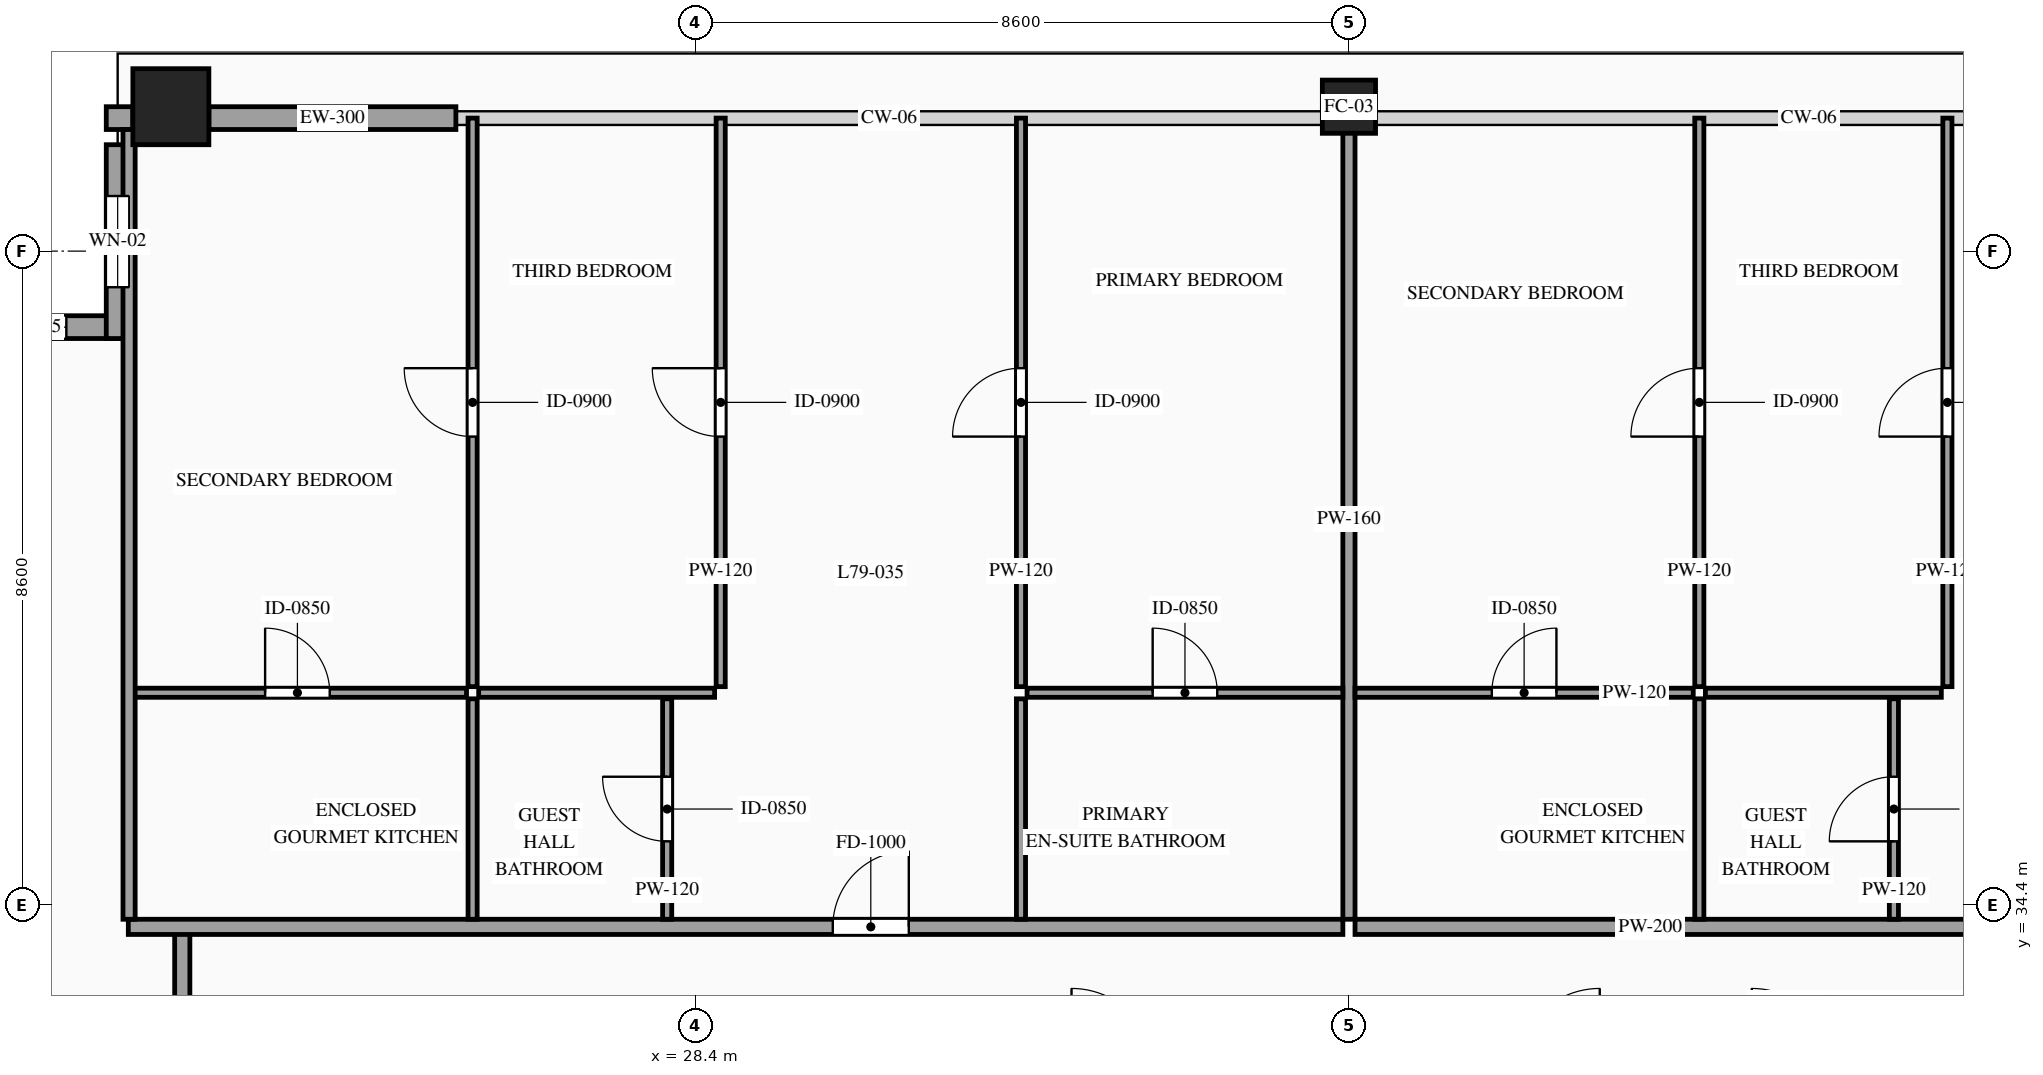
"""IFC4 building model, lengths in metres.
Left out: names, types, materials, properties, quantities, classifications, styles, units other than length and angle.
Written with IfcOpenShell. Run it as: python <this file> out.ifc"""

import sys

from ifc_helpers import new_model, si_unit, direction, frame, frame_2d, origin, origin_2d, place, context, subcontext, project, spatial, rectangle, hollow_rectangle, extrude, source, transform, mapped, element, fill, save


model = new_model("IFC4")
c1 = context("Model", 3, precision=1e-05, world=origin(), true_north=direction((0.0, 1.0)))
c2 = subcontext(c1, "Body", "Model", "MODEL_VIEW")
j1 = project(units=[si_unit("LENGTHUNIT", "METRE"), si_unit("PLANEANGLEUNIT", "RADIAN")], contexts=[c1])
p1 = place(None, origin())
s1 = spatial("IfcSite", under=j1, at=p1, CompositionType="ELEMENT")
p2 = place(p1, origin())
s2 = spatial("IfcBuilding", under=s1, at=p2, CompositionType="ELEMENT")
p3 = place(p2, frame((0.0, 0.0, 296.1)))
s3 = spatial("IfcBuildingStorey", under=s2, at=p3, CompositionType="ELEMENT", Elevation=296.1)
m1 = source(origin(), c2, "Body", "SweptSolid", [
    extrude(hollow_rectangle(XDim=1.0, YDim=1.0, WallThickness=0.048, at=origin_2d()), origin(), (0.0, 0.0, 1.0), 3.5),
])
p4 = place(p3, frame((21.5, 44.9, 0.0), z_axis=(0.0, 0.0, 1.0), x_axis=(1.0, 0.0, 0.0)))
e1 = element("IfcColumn", 1, at=p4, inside=s3, PredefinedType="COLUMN", context=c2, shape_type="MappedRepresentation", body=[
    mapped(m1, transform((0.0, 0.0, 0.0), scale=1.0)),
])
m2 = source(origin(), c2, "Body", "SweptSolid", [
    extrude(hollow_rectangle(XDim=0.7, YDim=0.7, WallThickness=0.032, at=origin_2d()), origin(), (0.0, 0.0, 1.0), 3.5),
])
p5 = place(p3, frame((37.0, 44.9, 0.0), z_axis=(0.0, 0.0, 1.0), x_axis=(1.0, 0.0, 0.0)))
e2 = element("IfcColumn", 2, at=p5, inside=s3, PredefinedType="COLUMN", context=c2, shape_type="MappedRepresentation", body=[
    mapped(m2, transform((0.0, 0.0, 0.0), scale=1.0)),
])
p6 = place(p3, frame((20.95, 42.0, 0.0), z_axis=(0.0, 0.0, 1.0), x_axis=(-1.0, 0.0, 0.0)))
e3 = element("IfcWall", 3, at=p6, inside=s3, PredefinedType="SOLIDWALL", context=c2, shape_type="SweptSolid", body=[
    extrude(rectangle(XDim=2.55, YDim=0.3, at=frame_2d((1.275, 0.0))), origin(), (0.0, 0.0, 1.0), 3.28),
])
p7 = place(p6, frame((0.825, 0.0, 0.85)))
e4 = element("IfcOpeningElement", 4, at=p7, cuts=e3, PredefinedType="OPENING", context=c2, shape_type="SweptSolid", body=[
    extrude(rectangle(XDim=0.9, YDim=1.5, at=frame_2d((0.45, 0.75))), frame((0.0, 0.165, 0.0), z_axis=(0.0, -1.0, 0.0), x_axis=(1.0, 0.0, 0.0)), (0.0, 0.0, 1.0), 0.33),
])
p8 = place(p3, frame((20.8, 44.4, 0.0), z_axis=(0.0, 0.0, 1.0), x_axis=(0.0, -1.0, 0.0)))
e5 = element("IfcWall", 5, at=p8, inside=s3, PredefinedType="SOLIDWALL", context=c2, shape_type="SweptSolid", body=[
    extrude(rectangle(XDim=2.55, YDim=0.3, at=frame_2d((1.275, 0.0))), origin(), (0.0, 0.0, 1.0), 3.28),
])
p9 = place(p8, frame((0.675, 0.0, 0.85)))
e6 = element("IfcOpeningElement", 6, at=p9, cuts=e5, PredefinedType="OPENING", context=c2, shape_type="SweptSolid", body=[
    extrude(rectangle(XDim=1.2, YDim=2.1, at=frame_2d((0.6, 1.05))), frame((0.0, 0.165, 0.0), z_axis=(0.0, -1.0, 0.0), x_axis=(1.0, 0.0, 0.0)), (0.0, 0.0, 1.0), 0.33),
])
m3 = source(origin(), c2, "Body", "SweptSolid", [
    extrude(rectangle(XDim=0.35, YDim=0.3, at=frame_2d((0.175, 0.0))), origin(), (0.0, 0.0, 1.0), 3.28),
])
p10 = place(p3, frame((20.65, 44.75, 0.0), z_axis=(0.0, 0.0, 1.0), x_axis=(1.0, 0.0, 0.0)))
e7 = element("IfcWall", 7, at=p10, inside=s3, PredefinedType="SOLIDWALL", context=c2, shape_type="MappedRepresentation", body=[
    mapped(m3, transform((0.0, 0.0, 0.0), scale=1.0)),
])
m4 = source(origin(), c2, "Body", "SweptSolid", [
    extrude(rectangle(XDim=3.25, YDim=0.3, at=frame_2d((1.625, 0.0))), origin(), (0.0, 0.0, 1.0), 2.885),
])
p11 = place(p3, frame((22.0, 44.75, 0.0), z_axis=(0.0, 0.0, 1.0), x_axis=(1.0, 0.0, 0.0)))
e8 = element("IfcWall", 8, at=p11, inside=s3, PredefinedType="SOLIDWALL", context=c2, shape_type="MappedRepresentation", body=[
    mapped(m4, transform((0.0, 0.0, 0.0), scale=1.0)),
])
m5 = source(origin(), c2, "Body", "SweptSolid", [
    extrude(rectangle(XDim=1.7, YDim=0.2, at=frame_2d((0.85, 0.0))), origin(), (0.0, 0.0, 1.0), 3.28),
])
p12 = place(p3, frame((21.65, 32.35, 0.0), z_axis=(0.0, 0.0, 1.0), x_axis=(0.0, 1.0, 0.0)))
e9 = element("IfcWall", 9, at=p12, inside=s3, PredefinedType="PARTITIONING", context=c2, shape_type="MappedRepresentation", body=[
    mapped(m5, transform((0.0, 0.0, 0.0), scale=1.0)),
])
p13 = place(p3, frame((20.94, 34.11, 0.0), z_axis=(0.0, 0.0, 1.0), x_axis=(1.0, 0.0, 0.0)))
e10 = element("IfcWall", 10, at=p13, inside=s3, PredefinedType="PARTITIONING", context=c2, shape_type="SweptSolid", body=[
    extrude(rectangle(XDim=15.98, YDim=0.2, at=frame_2d((7.99, 0.0))), origin(), (0.0, 0.0, 1.0), 3.28),
])
p14 = place(p13, frame((9.269, 0.0, 0.0)))
e11 = element("IfcOpeningElement", 11, at=p14, cuts=e10, PredefinedType="OPENING", context=c2, shape_type="SweptSolid", body=[
    extrude(rectangle(XDim=1.0, YDim=2.2, at=frame_2d((0.5, 1.1))), frame((0.0, 0.115, 0.0), z_axis=(0.0, -1.0, 0.0), x_axis=(1.0, 0.0, 0.0)), (0.0, 0.0, 1.0), 0.23),
])
m6 = source(origin(), c2, "Body", "SweptSolid", [
    extrude(rectangle(XDim=10.54, YDim=0.16, at=frame_2d((5.27, 0.0))), origin(), (0.0, 0.0, 1.0), 2.787),
])
p15 = place(p3, frame((37.0, 34.21, 0.0), z_axis=(0.0, 0.0, 1.0), x_axis=(0.0, 1.0, 0.0)))
e12 = element("IfcWall", 12, at=p15, inside=s3, PredefinedType="PARTITIONING", context=c2, shape_type="MappedRepresentation", body=[
    mapped(m6, transform((0.0, 0.0, 0.0), scale=1.0)),
])
p16 = place(p3, frame((20.94, 37.19, 0.0), z_axis=(0.0, 0.0, 1.0), x_axis=(1.0, 0.0, 0.0)))
e13 = element("IfcWall", 13, at=p16, inside=s3, PredefinedType="PARTITIONING", context=c2, shape_type="SweptSolid", body=[
    extrude(rectangle(XDim=4.45, YDim=0.12, at=frame_2d((2.225, 0.0))), origin(), (0.0, 0.0, 1.0), 3.28),
])
p17 = place(p16, frame((1.8, 0.0, 0.0)))
e14 = element("IfcOpeningElement", 14, at=p17, cuts=e13, PredefinedType="OPENING", context=c2, shape_type="SweptSolid", body=[
    extrude(rectangle(XDim=0.85, YDim=2.1, at=frame_2d((0.425, 1.05))), frame((0.0, 0.075, 0.0), z_axis=(0.0, -1.0, 0.0), x_axis=(1.0, 0.0, 0.0)), (0.0, 0.0, 1.0), 0.15),
])
m7 = source(origin(), c2, "Body", "SweptSolid", [
    extrude(rectangle(XDim=2.9, YDim=0.12, at=frame_2d((1.45, 0.0))), origin(), (0.0, 0.0, 1.0), 3.28),
])
p18 = place(p3, frame((25.47, 34.21, 0.0), z_axis=(0.0, 0.0, 1.0), x_axis=(0.0, 1.0, 0.0)))
e15 = element("IfcWall", 15, at=p18, inside=s3, PredefinedType="PARTITIONING", context=c2, shape_type="MappedRepresentation", body=[
    mapped(m7, transform((0.0, 0.0, 0.0), scale=1.0)),
])
p19 = place(p3, frame((28.03, 34.21, 0.0), z_axis=(0.0, 0.0, 1.0), x_axis=(0.0, 1.0, 0.0)))
e16 = element("IfcWall", 16, at=p19, inside=s3, PredefinedType="PARTITIONING", context=c2, shape_type="SweptSolid", body=[
    extrude(rectangle(XDim=2.9, YDim=0.12, at=frame_2d((1.45, 0.0))), origin(), (0.0, 0.0, 1.0), 3.28),
])
p20 = place(p19, frame((1.025, 0.0, 0.0)))
e17 = element("IfcOpeningElement", 17, at=p20, cuts=e16, PredefinedType="OPENING", context=c2, shape_type="SweptSolid", body=[
    extrude(rectangle(XDim=0.85, YDim=2.1, at=frame_2d((0.425, 1.05))), frame((0.0, 0.075, 0.0), z_axis=(0.0, -1.0, 0.0), x_axis=(1.0, 0.0, 0.0)), (0.0, 0.0, 1.0), 0.15),
])
p21 = place(p3, frame((32.765, 37.19, 0.0), z_axis=(0.0, 0.0, 1.0), x_axis=(1.0, 0.0, 0.0)))
e18 = element("IfcWall", 18, at=p21, inside=s3, PredefinedType="PARTITIONING", context=c2, shape_type="SweptSolid", body=[
    extrude(rectangle(XDim=4.155, YDim=0.12, at=frame_2d((2.078, 0.0))), origin(), (0.0, 0.0, 1.0), 3.28),
])
p22 = place(p21, frame((1.653, 0.0, 0.0)))
e19 = element("IfcOpeningElement", 19, at=p22, cuts=e18, PredefinedType="OPENING", context=c2, shape_type="SweptSolid", body=[
    extrude(rectangle(XDim=0.85, YDim=2.1, at=frame_2d((0.425, 1.05))), frame((0.0, 0.075, 0.0), z_axis=(0.0, -1.0, 0.0), x_axis=(1.0, 0.0, 0.0)), (0.0, 0.0, 1.0), 0.15),
])
p23 = place(p3, frame((32.685, 34.21, 0.0), z_axis=(0.0, 0.0, 1.0), x_axis=(0.0, 1.0, 0.0)))
e20 = element("IfcWall", 20, at=p23, inside=s3, PredefinedType="PARTITIONING", context=c2, shape_type="MappedRepresentation", body=[
    mapped(m7, transform((0.0, 0.0, 0.0), scale=1.0)),
])
p24 = place(p3, frame((25.47, 37.27, 0.0), z_axis=(0.0, 0.0, 1.0), x_axis=(0.0, 1.0, 0.0)))
e21 = element("IfcWall", 21, at=p24, inside=s3, PredefinedType="PARTITIONING", context=c2, shape_type="SweptSolid", body=[
    extrude(rectangle(XDim=7.48, YDim=0.12, at=frame_2d((3.74, 0.0))), origin(), (0.0, 0.0, 1.0), 3.28),
])
p25 = place(p24, frame((3.29, 0.0, 0.0)))
e22 = element("IfcOpeningElement", 22, at=p25, cuts=e21, PredefinedType="OPENING", context=c2, shape_type="SweptSolid", body=[
    extrude(rectangle(XDim=0.9, YDim=2.15, at=frame_2d((0.45, 1.075))), frame((0.0, 0.075, 0.0), z_axis=(0.0, -1.0, 0.0), x_axis=(1.0, 0.0, 0.0)), (0.0, 0.0, 1.0), 0.15),
])
p26 = place(p3, frame((32.685, 37.27, 0.0), z_axis=(0.0, 0.0, 1.0), x_axis=(0.0, 1.0, 0.0)))
e23 = element("IfcWall", 23, at=p26, inside=s3, PredefinedType="PARTITIONING", context=c2, shape_type="SweptSolid", body=[
    extrude(rectangle(XDim=7.48, YDim=0.12, at=frame_2d((3.74, 0.0))), origin(), (0.0, 0.0, 1.0), 3.28),
])
p27 = place(p26, frame((3.29, 0.0, 0.0)))
e24 = element("IfcOpeningElement", 24, at=p27, cuts=e23, PredefinedType="OPENING", context=c2, shape_type="SweptSolid", body=[
    extrude(rectangle(XDim=0.9, YDim=2.15, at=frame_2d((0.45, 1.075))), frame((0.0, 0.075, 0.0), z_axis=(0.0, -1.0, 0.0), x_axis=(1.0, 0.0, 0.0)), (0.0, 0.0, 1.0), 0.15),
])
m8 = source(origin(), c2, "Body", "SweptSolid", [
    extrude(rectangle(XDim=3.104, YDim=0.12, at=frame_2d((1.552, 0.0))), origin(), (0.0, 0.0, 1.0), 3.28),
])
p28 = place(p3, frame((25.55, 37.19, 0.0), z_axis=(0.0, 0.0, 1.0), x_axis=(1.0, 0.0, 0.0)))
e25 = element("IfcWall", 25, at=p28, inside=s3, PredefinedType="PARTITIONING", context=c2, shape_type="MappedRepresentation", body=[
    mapped(m8, transform((0.0, 0.0, 0.0), scale=1.0)),
])
p29 = place(p3, frame((28.734, 37.27, 0.0), z_axis=(0.0, 0.0, 1.0), x_axis=(0.0, 1.0, 0.0)))
e26 = element("IfcWall", 26, at=p29, inside=s3, PredefinedType="PARTITIONING", context=c2, shape_type="SweptSolid", body=[
    extrude(rectangle(XDim=7.48, YDim=0.12, at=frame_2d((3.74, 0.0))), origin(), (0.0, 0.0, 1.0), 3.28),
])
p30 = place(p29, frame((3.29, 0.0, 0.0)))
e27 = element("IfcOpeningElement", 27, at=p30, cuts=e26, PredefinedType="OPENING", context=c2, shape_type="SweptSolid", body=[
    extrude(rectangle(XDim=0.9, YDim=2.15, at=frame_2d((0.45, 1.075))), frame((0.0, 0.075, 0.0), z_axis=(0.0, -1.0, 0.0), x_axis=(1.0, 0.0, 0.0)), (0.0, 0.0, 1.0), 0.15),
])
p31 = place(p3, frame((37.08, 34.11, 0.0), z_axis=(0.0, 0.0, 1.0), x_axis=(1.0, 0.0, 0.0)))
e28 = element("IfcWall", 28, at=p31, inside=s3, PredefinedType="PARTITIONING", context=c2, shape_type="SweptSolid", body=[
    extrude(rectangle(XDim=15.98, YDim=0.2, at=frame_2d((7.99, 0.0))), origin(), (0.0, 0.0, 1.0), 3.28),
])
p32 = place(p31, frame((8.022, 0.0, 0.0)))
e29 = element("IfcOpeningElement", 29, at=p32, cuts=e28, PredefinedType="OPENING", context=c2, shape_type="SweptSolid", body=[
    extrude(rectangle(XDim=1.0, YDim=2.2, at=frame_2d((0.5, 1.1))), frame((0.0, 0.115, 0.0), z_axis=(0.0, -1.0, 0.0), x_axis=(1.0, 0.0, 0.0)), (0.0, 0.0, 1.0), 0.23),
])
m9 = source(origin(), c2, "Body", "SweptSolid", [
    extrude(rectangle(XDim=10.39, YDim=0.16, at=frame_2d((5.195, 0.0))), origin(), (0.0, 0.0, 1.0), 3.28),
])
p33 = place(p3, frame((20.95, 34.21, 0.0), z_axis=(0.0, 0.0, 1.0), x_axis=(0.0, 1.0, 0.0)))
e30 = element("IfcWall", 30, at=p33, inside=s3, PredefinedType="PARTITIONING", context=c2, shape_type="MappedRepresentation", body=[
    mapped(m9, transform((0.0, 0.0, 0.0), scale=1.0)),
])
p34 = place(p3, frame((37.08, 37.19, 0.0), z_axis=(0.0, 0.0, 1.0), x_axis=(1.0, 0.0, 0.0)))
e31 = element("IfcWall", 31, at=p34, inside=s3, PredefinedType="PARTITIONING", context=c2, shape_type="SweptSolid", body=[
    extrude(rectangle(XDim=4.45, YDim=0.12, at=frame_2d((2.225, 0.0))), origin(), (0.0, 0.0, 1.0), 3.28),
])
p35 = place(p34, frame((1.8, 0.0, 0.0)))
e32 = element("IfcOpeningElement", 32, at=p35, cuts=e31, PredefinedType="OPENING", context=c2, shape_type="SweptSolid", body=[
    extrude(rectangle(XDim=0.85, YDim=2.1, at=frame_2d((0.425, 1.05))), frame((0.0, 0.075, 0.0), z_axis=(0.0, -1.0, 0.0), x_axis=(1.0, 0.0, 0.0)), (0.0, 0.0, 1.0), 0.15),
])
p36 = place(p3, frame((41.61, 34.21, 0.0), z_axis=(0.0, 0.0, 1.0), x_axis=(0.0, 1.0, 0.0)))
e33 = element("IfcWall", 33, at=p36, inside=s3, PredefinedType="PARTITIONING", context=c2, shape_type="MappedRepresentation", body=[
    mapped(m7, transform((0.0, 0.0, 0.0), scale=1.0)),
])
p37 = place(p3, frame((44.17, 34.21, 0.0), z_axis=(0.0, 0.0, 1.0), x_axis=(0.0, 1.0, 0.0)))
e34 = element("IfcWall", 34, at=p37, inside=s3, PredefinedType="PARTITIONING", context=c2, shape_type="SweptSolid", body=[
    extrude(rectangle(XDim=2.9, YDim=0.12, at=frame_2d((1.45, 0.0))), origin(), (0.0, 0.0, 1.0), 3.28),
])
p38 = place(p37, frame((1.025, 0.0, 0.0)))
e35 = element("IfcOpeningElement", 35, at=p38, cuts=e34, PredefinedType="OPENING", context=c2, shape_type="SweptSolid", body=[
    extrude(rectangle(XDim=0.85, YDim=2.1, at=frame_2d((0.425, 1.05))), frame((0.0, 0.075, 0.0), z_axis=(0.0, -1.0, 0.0), x_axis=(1.0, 0.0, 0.0)), (0.0, 0.0, 1.0), 0.15),
])
p39 = place(p3, frame((41.61, 37.27, 0.0), z_axis=(0.0, 0.0, 1.0), x_axis=(0.0, 1.0, 0.0)))
e36 = element("IfcWall", 36, at=p39, inside=s3, PredefinedType="PARTITIONING", context=c2, shape_type="SweptSolid", body=[
    extrude(rectangle(XDim=7.48, YDim=0.12, at=frame_2d((3.74, 0.0))), origin(), (0.0, 0.0, 1.0), 3.28),
])
p40 = place(p39, frame((3.29, 0.0, 0.0)))
e37 = element("IfcOpeningElement", 37, at=p40, cuts=e36, PredefinedType="OPENING", context=c2, shape_type="SweptSolid", body=[
    extrude(rectangle(XDim=0.9, YDim=2.15, at=frame_2d((0.45, 1.075))), frame((0.0, 0.075, 0.0), z_axis=(0.0, -1.0, 0.0), x_axis=(1.0, 0.0, 0.0)), (0.0, 0.0, 1.0), 0.15),
])
p41 = place(p3, frame((41.69, 37.19, 0.0), z_axis=(0.0, 0.0, 1.0), x_axis=(1.0, 0.0, 0.0)))
e38 = element("IfcWall", 38, at=p41, inside=s3, PredefinedType="PARTITIONING", context=c2, shape_type="MappedRepresentation", body=[
    mapped(m8, transform((0.0, 0.0, 0.0), scale=1.0)),
])
p42 = place(p3, frame((44.874, 37.27, 0.0), z_axis=(0.0, 0.0, 1.0), x_axis=(0.0, 1.0, 0.0)))
e39 = element("IfcWall", 39, at=p42, inside=s3, PredefinedType="PARTITIONING", context=c2, shape_type="SweptSolid", body=[
    extrude(rectangle(XDim=7.48, YDim=0.12, at=frame_2d((3.74, 0.0))), origin(), (0.0, 0.0, 1.0), 3.28),
])
p43 = place(p42, frame((3.29, 0.0, 0.0)))
e40 = element("IfcOpeningElement", 40, at=p43, cuts=e39, PredefinedType="OPENING", context=c2, shape_type="SweptSolid", body=[
    extrude(rectangle(XDim=0.9, YDim=2.15, at=frame_2d((0.45, 1.075))), frame((0.0, 0.075, 0.0), z_axis=(0.0, -1.0, 0.0), x_axis=(1.0, 0.0, 0.0)), (0.0, 0.0, 1.0), 0.15),
])
m10 = source(origin(), c2, "Body", "SweptSolid", [
    extrude(rectangle(XDim=0.9, YDim=1.5, at=frame_2d((0.45, 0.75))), frame((0.0, 0.03, 0.0), z_axis=(0.0, -1.0, 0.0), x_axis=(1.0, 0.0, 0.0)), (0.0, 0.0, 1.0), 0.06),
])
p44 = place(p7, origin())
e41 = element("IfcWindow", 41, at=p44, inside=s3, PartitioningType="SINGLE_PANEL", PredefinedType="WINDOW", context=c2, shape_type="MappedRepresentation", body=[
    mapped(m10, transform((0.0, 0.0, 0.0), scale=1.0)),
])
fill(e4, e41)
m11 = source(origin(), c2, "Body", "SweptSolid", [
    extrude(rectangle(XDim=1.2, YDim=2.1, at=frame_2d((0.6, 1.05))), frame((0.0, 0.03, 0.0), z_axis=(0.0, -1.0, 0.0), x_axis=(1.0, 0.0, 0.0)), (0.0, 0.0, 1.0), 0.06),
])
p45 = place(p9, origin())
e42 = element("IfcWindow", 42, at=p45, inside=s3, PartitioningType="SINGLE_PANEL", PredefinedType="WINDOW", context=c2, shape_type="MappedRepresentation", body=[
    mapped(m11, transform((0.0, 0.0, 0.0), scale=1.0)),
])
fill(e6, e42)
m12 = source(origin(), c2, "Body", "SweptSolid", [
    extrude(rectangle(XDim=1.0, YDim=2.2, at=frame_2d((0.5, 1.1))), frame((0.0, 0.025, 0.0), z_axis=(0.0, -1.0, 0.0), x_axis=(1.0, 0.0, 0.0)), (0.0, 0.0, 1.0), 0.05),
])
p46 = place(p14, origin())
e43 = element("IfcDoor", 43, at=p46, inside=s3, OperationType="SINGLE_SWING_RIGHT", PredefinedType="DOOR", context=c2, shape_type="MappedRepresentation", body=[
    mapped(m12, transform((0.0, 0.0, 0.0), scale=1.0)),
])
fill(e11, e43)
m13 = source(origin(), c2, "Body", "SweptSolid", [
    extrude(rectangle(XDim=0.85, YDim=2.1, at=frame_2d((0.425, 1.05))), frame((0.0, 0.025, 0.0), z_axis=(0.0, -1.0, 0.0), x_axis=(1.0, 0.0, 0.0)), (0.0, 0.0, 1.0), 0.05),
])
p47 = place(p17, origin())
e44 = element("IfcDoor", 44, at=p47, inside=s3, OperationType="SINGLE_SWING_LEFT", PredefinedType="DOOR", context=c2, shape_type="MappedRepresentation", body=[
    mapped(m13, transform((0.0, 0.0, 0.0), scale=1.0)),
])
fill(e14, e44)
p48 = place(p20, origin())
e45 = element("IfcDoor", 45, at=p48, inside=s3, OperationType="SINGLE_SWING_RIGHT", PredefinedType="DOOR", context=c2, shape_type="MappedRepresentation", body=[
    mapped(m13, transform((0.0, 0.0, 0.0), scale=1.0)),
])
fill(e17, e45)
p49 = place(p22, origin())
e46 = element("IfcDoor", 46, at=p49, inside=s3, OperationType="SINGLE_SWING_LEFT", PredefinedType="DOOR", context=c2, shape_type="MappedRepresentation", body=[
    mapped(m13, transform((0.0, 0.0, 0.0), scale=1.0)),
])
fill(e19, e46)
m14 = source(origin(), c2, "Body", "SweptSolid", [
    extrude(rectangle(XDim=0.9, YDim=2.15, at=frame_2d((0.45, 1.075))), frame((0.0, 0.025, 0.0), z_axis=(0.0, -1.0, 0.0), x_axis=(1.0, 0.0, 0.0)), (0.0, 0.0, 1.0), 0.05),
])
p50 = place(p25, origin())
e47 = element("IfcDoor", 47, at=p50, inside=s3, OperationType="SINGLE_SWING_RIGHT", PredefinedType="DOOR", context=c2, shape_type="MappedRepresentation", body=[
    mapped(m14, transform((0.0, 0.0, 0.0), scale=1.0)),
])
fill(e22, e47)
p51 = place(p27, origin())
e48 = element("IfcDoor", 48, at=p51, inside=s3, OperationType="SINGLE_SWING_LEFT", PredefinedType="DOOR", context=c2, shape_type="MappedRepresentation", body=[
    mapped(m14, transform((0.0, 0.0, 0.0), scale=1.0)),
])
fill(e24, e48)
p52 = place(p30, origin())
e49 = element("IfcDoor", 49, at=p52, inside=s3, OperationType="SINGLE_SWING_RIGHT", PredefinedType="DOOR", context=c2, shape_type="MappedRepresentation", body=[
    mapped(m14, transform((0.0, 0.0, 0.0), scale=1.0)),
])
fill(e27, e49)
p53 = place(p35, origin())
e50 = element("IfcDoor", 50, at=p53, inside=s3, OperationType="SINGLE_SWING_RIGHT", PredefinedType="DOOR", context=c2, shape_type="MappedRepresentation", body=[
    mapped(m13, transform((0.0, 0.0, 0.0), scale=1.0)),
])
fill(e32, e50)
p54 = place(p38, origin())
e51 = element("IfcDoor", 51, at=p54, inside=s3, OperationType="SINGLE_SWING_LEFT", PredefinedType="DOOR", context=c2, shape_type="MappedRepresentation", body=[
    mapped(m13, transform((0.0, 0.0, 0.0), scale=1.0)),
])
fill(e35, e51)
p55 = place(p40, origin())
e52 = element("IfcDoor", 52, at=p55, inside=s3, OperationType="SINGLE_SWING_LEFT", PredefinedType="DOOR", context=c2, shape_type="MappedRepresentation", body=[
    mapped(m14, transform((0.0, 0.0, 0.0), scale=1.0)),
])
fill(e37, e52)
p56 = place(p43, origin())
e53 = element("IfcDoor", 53, at=p56, inside=s3, OperationType="SINGLE_SWING_LEFT", PredefinedType="DOOR", context=c2, shape_type="MappedRepresentation", body=[
    mapped(m14, transform((0.0, 0.0, 0.0), scale=1.0)),
])
fill(e40, e53)
save(model, sys.argv[1])
